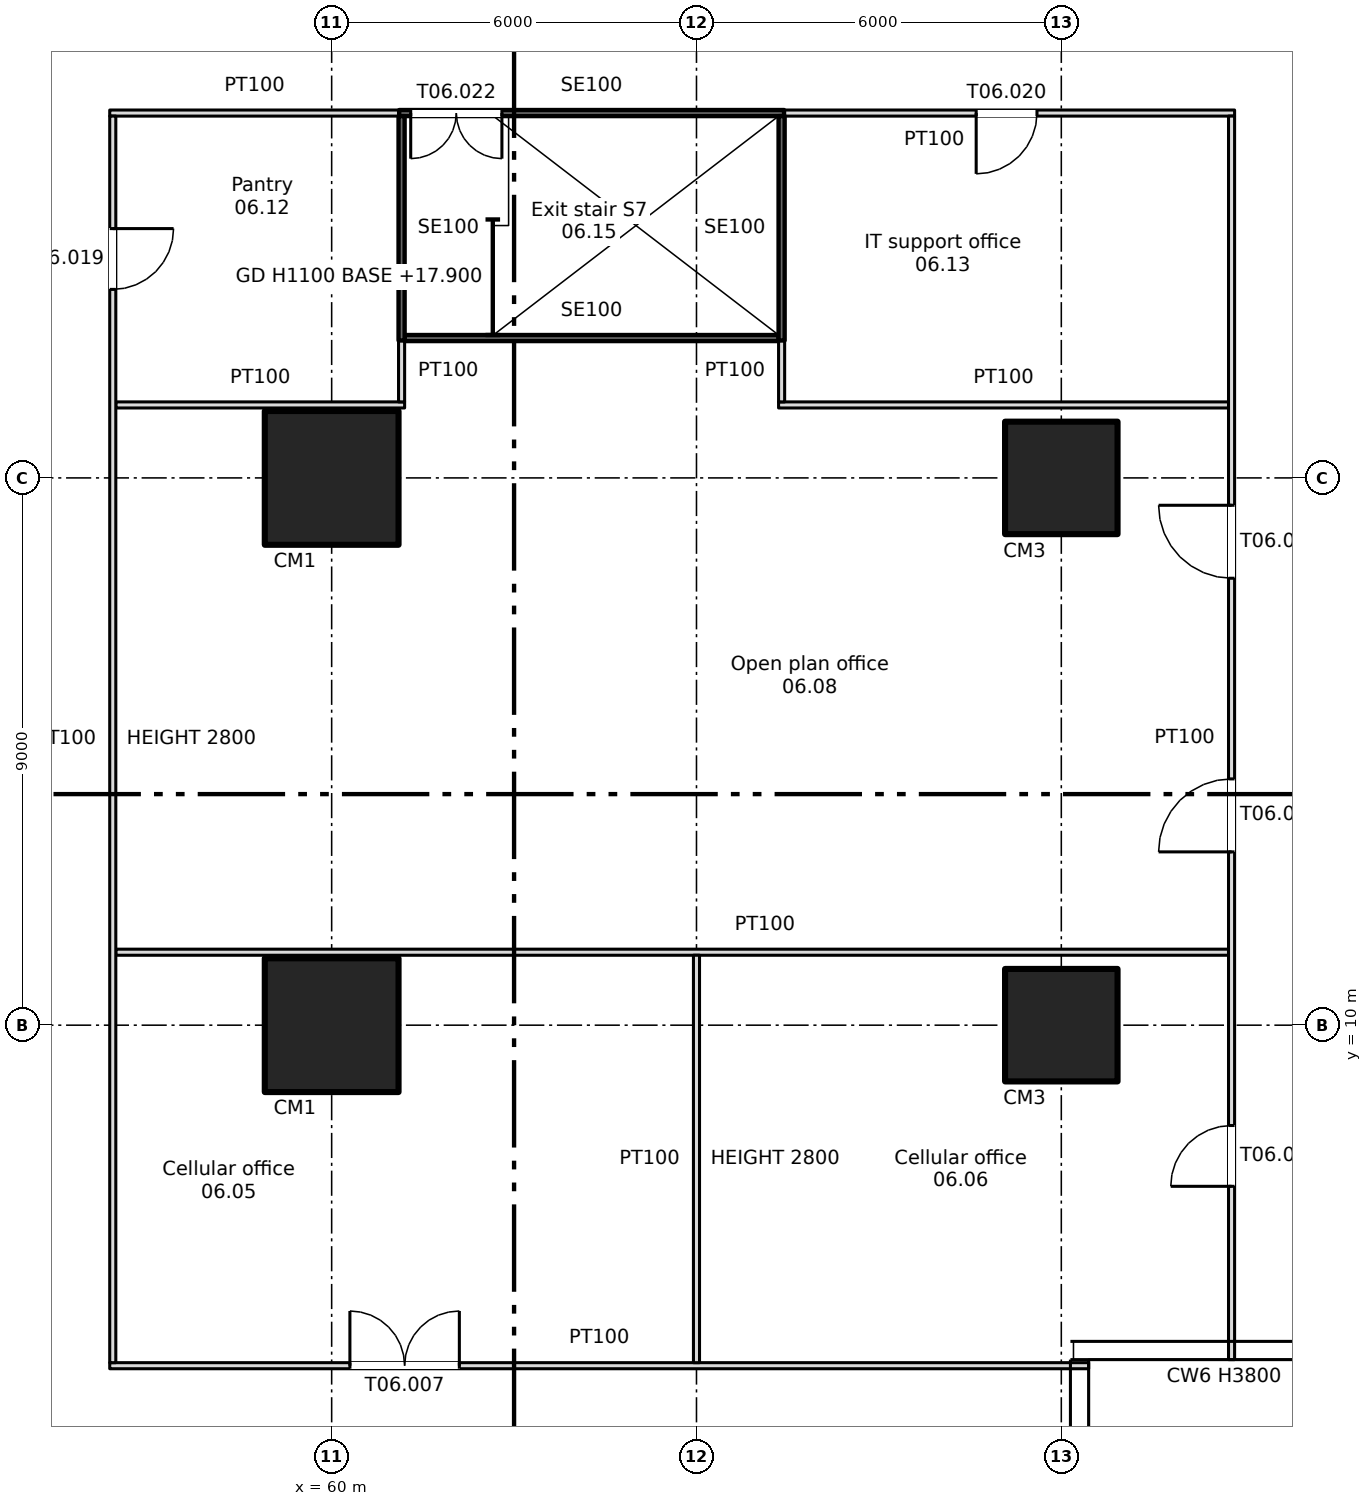
"""IFC4 building model, lengths in metres.
Left out: names, types, materials, properties, quantities, classifications, styles, units other than length and angle.
Written with IfcOpenShell. Run it as: python <this file> out.ifc"""

import sys

from ifc_helpers import new_model, si_unit, direction, frame, frame_2d, origin, origin_2d, place, context, subcontext, project, spatial, rectangle, extrude, element, fill, save


model = new_model("IFC4")
c1 = context("Model", 3, precision=1e-05, world=origin(), true_north=direction((0.0, 1.0)))
c2 = subcontext(c1, "Body", "Model", "MODEL_VIEW")
j1 = project(units=[si_unit("LENGTHUNIT", "METRE"), si_unit("PLANEANGLEUNIT", "RADIAN")], contexts=[c1])
p1 = place(None, origin())
s1 = spatial("IfcSite", under=j1, at=p1, CompositionType="ELEMENT")
p2 = place(p1, origin())
s2 = spatial("IfcBuilding", under=s1, at=p2, CompositionType="ELEMENT")
p3 = place(p2, frame((0.0, 0.0, 17.9)))
s3 = spatial("IfcBuildingStorey", under=s2, at=p3, CompositionType="ELEMENT", Elevation=17.9)
for number, where, z_axis, x_axis in (
    (1, (60.0, 10.0, 0.0), (0.0, 0.0, 1.0), (1.0, 0.0, 0.0)),
    (2, (60.0, 19.0, 0.0), (0.0, 0.0, 1.0), (1.0, 0.0, 0.0)),
):
    element("IfcColumn", number, at=place(p3, frame(where, z_axis=z_axis, x_axis=x_axis)), inside=s3, PredefinedType="COLUMN", context=c2, shape_type="SweptSolid", body=[
        extrude(rectangle(XDim=2.2, YDim=2.2, at=origin_2d()), origin(), (0.0, 0.0, 1.0), 3.8),
    ])
for number, where, z_axis, x_axis in (
    (3, (72.0, 10.0, 0.0), (0.0, 0.0, 1.0), (1.0, 0.0, 0.0)),
    (4, (72.0, 19.0, 0.0), (0.0, 0.0, 1.0), (1.0, 0.0, 0.0)),
):
    element("IfcColumn", number, at=place(p3, frame(where, z_axis=z_axis, x_axis=x_axis)), inside=s3, PredefinedType="COLUMN", context=c2, shape_type="SweptSolid", body=[
        extrude(rectangle(XDim=1.85, YDim=1.85, at=origin_2d()), origin(), (0.0, 0.0, 1.0), 3.8),
    ])
p4 = place(p3, frame((56.35, 4.4, 0.0), z_axis=(0.0, 0.0, 1.0), x_axis=(1.0, 0.0, 0.0)))
e5 = element("IfcWall", 5, at=p4, inside=s3, PredefinedType="PARTITIONING", context=c2, shape_type="SweptSolid", body=[
    extrude(rectangle(XDim=16.1, YDim=0.1, at=frame_2d((8.05, 0.0))), origin(), (0.0, 0.0, 1.0), 3.8),
])
p5 = place(p4, frame((3.95, 0.0, 0.0)))
e6 = element("IfcOpeningElement", 6, at=p5, cuts=e5, PredefinedType="OPENING", context=c2, shape_type="SweptSolid", body=[
    extrude(rectangle(XDim=1.8, YDim=2.1, at=frame_2d((0.9, 1.05))), frame((0.0, 0.06, 0.0), z_axis=(0.0, -1.0, 0.0), x_axis=(1.0, 0.0, 0.0)), (0.0, 0.0, 1.0), 0.12),
])
p6 = place(p3, frame((56.45, 11.2, 0.0), z_axis=(0.0, 0.0, 1.0), x_axis=(1.0, 0.0, 0.0)))
e7 = element("IfcWall", 7, at=p6, inside=s3, PredefinedType="PARTITIONING", context=c2, shape_type="SweptSolid", body=[
    extrude(rectangle(XDim=18.3, YDim=0.1, at=frame_2d((9.15, 0.0))), origin(), (0.0, 0.0, 1.0), 3.8),
])
p7 = place(p3, frame((56.45, 20.2, 0.0), z_axis=(0.0, 0.0, 1.0), x_axis=(1.0, 0.0, 0.0)))
e8 = element("IfcWall", 8, at=p7, inside=s3, PredefinedType="PARTITIONING", context=c2, shape_type="SweptSolid", body=[
    extrude(rectangle(XDim=4.75, YDim=0.1, at=frame_2d((2.375, 0.0))), origin(), (0.0, 0.0, 1.0), 3.8),
])
p8 = place(p3, frame((67.35, 20.2, 0.0), z_axis=(0.0, 0.0, 1.0), x_axis=(1.0, 0.0, 0.0)))
e9 = element("IfcWall", 9, at=p8, inside=s3, PredefinedType="PARTITIONING", context=c2, shape_type="SweptSolid", body=[
    extrude(rectangle(XDim=7.4, YDim=0.1, at=frame_2d((3.7, 0.0))), origin(), (0.0, 0.0, 1.0), 3.8),
])
p9 = place(p3, frame((61.2, 21.3, 0.0), z_axis=(0.0, 0.0, 1.0), x_axis=(1.0, 0.0, 0.0)))
e10 = element("IfcWall", 10, at=p9, inside=s3, PredefinedType="SOLIDWALL", context=c2, shape_type="SweptSolid", body=[
    extrude(rectangle(XDim=6.15, YDim=0.1, at=frame_2d((3.075, 0.0))), origin(), (0.0, 0.0, 1.0), 3.8),
])
p10 = place(p3, frame((56.35, 25.0, 0.0), z_axis=(0.0, 0.0, 1.0), x_axis=(1.0, 0.0, 0.0)))
e11 = element("IfcWall", 11, at=p10, inside=s3, PredefinedType="PARTITIONING", context=c2, shape_type="SweptSolid", body=[
    extrude(rectangle(XDim=4.76, YDim=0.1, at=frame_2d((2.38, 0.0))), origin(), (0.0, 0.0, 1.0), 3.8),
])
p11 = place(p3, frame((61.11, 25.0, 0.0), z_axis=(0.0, 0.0, 1.0), x_axis=(1.0, 0.0, 0.0)))
e12 = element("IfcWall", 12, at=p11, inside=s3, PredefinedType="SOLIDWALL", context=c2, shape_type="SweptSolid", body=[
    extrude(rectangle(XDim=6.33, YDim=0.1, at=frame_2d((3.165, 0.0))), origin(), (0.0, 0.0, 1.0), 3.8),
])
p12 = place(p11, frame((0.19, 0.0, 0.0)))
e13 = element("IfcOpeningElement", 13, at=p12, cuts=e12, PredefinedType="OPENING", context=c2, shape_type="SweptSolid", body=[
    extrude(rectangle(XDim=1.5, YDim=2.1, at=frame_2d((0.75, 1.05))), frame((0.0, 0.06, 0.0), z_axis=(0.0, -1.0, 0.0), x_axis=(1.0, 0.0, 0.0)), (0.0, 0.0, 1.0), 0.12),
])
p13 = place(p3, frame((67.44, 25.0, 0.0), z_axis=(0.0, 0.0, 1.0), x_axis=(1.0, 0.0, 0.0)))
e14 = element("IfcWall", 14, at=p13, inside=s3, PredefinedType="PARTITIONING", context=c2, shape_type="SweptSolid", body=[
    extrude(rectangle(XDim=7.41, YDim=0.1, at=frame_2d((3.705, 0.0))), origin(), (0.0, 0.0, 1.0), 3.8),
])
p14 = place(p13, frame((3.16, 0.0, 0.0)))
e15 = element("IfcOpeningElement", 15, at=p14, cuts=e14, PredefinedType="OPENING", context=c2, shape_type="SweptSolid", body=[
    extrude(rectangle(XDim=1.0, YDim=2.1, at=frame_2d((0.5, 1.05))), frame((0.0, 0.06, 0.0), z_axis=(0.0, -1.0, 0.0), x_axis=(1.0, 0.0, 0.0)), (0.0, 0.0, 1.0), 0.12),
])
p15 = place(p3, frame((56.4, 4.45, 0.0), z_axis=(0.0, 0.0, 1.0), x_axis=(0.0, 1.0, 0.0)))
e16 = element("IfcWall", 16, at=p15, inside=s3, PredefinedType="PARTITIONING", context=c2, shape_type="SweptSolid", body=[
    extrude(rectangle(XDim=20.5, YDim=0.1, at=frame_2d((10.25, 0.0))), origin(), (0.0, 0.0, 1.0), 2.8),
])
p16 = place(p15, frame((17.65, 0.0, 0.0)))
e17 = element("IfcOpeningElement", 17, at=p16, cuts=e16, PredefinedType="OPENING", context=c2, shape_type="SweptSolid", body=[
    extrude(rectangle(XDim=1.0, YDim=2.1, at=frame_2d((0.5, 1.05))), frame((0.0, 0.06, 0.0), z_axis=(0.0, -1.0, 0.0), x_axis=(1.0, 0.0, 0.0)), (0.0, 0.0, 1.0), 0.12),
])
p17 = place(p3, frame((61.15, 20.25, 0.0), z_axis=(0.0, 0.0, 1.0), x_axis=(0.0, 1.0, 0.0)))
e18 = element("IfcWall", 18, at=p17, inside=s3, PredefinedType="PARTITIONING", context=c2, shape_type="SweptSolid", body=[
    extrude(rectangle(XDim=1.01, YDim=0.1, at=frame_2d((0.505, 0.0))), origin(), (0.0, 0.0, 1.0), 3.8),
])
p18 = place(p3, frame((61.15, 21.26, 0.0), z_axis=(0.0, 0.0, 1.0), x_axis=(0.0, 1.0, 0.0)))
e19 = element("IfcWall", 19, at=p18, inside=s3, PredefinedType="SOLIDWALL", context=c2, shape_type="SweptSolid", body=[
    extrude(rectangle(XDim=3.69, YDim=0.1, at=frame_2d((1.845, 0.0))), origin(), (0.0, 0.0, 1.0), 3.8),
])
p19 = place(p3, frame((66.0, 4.45, 0.0), z_axis=(0.0, 0.0, 1.0), x_axis=(0.0, 1.0, 0.0)))
e20 = element("IfcWall", 20, at=p19, inside=s3, PredefinedType="PARTITIONING", context=c2, shape_type="SweptSolid", body=[
    extrude(rectangle(XDim=6.7, YDim=0.1, at=frame_2d((3.35, 0.0))), origin(), (0.0, 0.0, 1.0), 2.8),
])
p20 = place(p3, frame((67.4, 20.25, 0.0), z_axis=(0.0, 0.0, 1.0), x_axis=(0.0, 1.0, 0.0)))
e21 = element("IfcWall", 21, at=p20, inside=s3, PredefinedType="PARTITIONING", context=c2, shape_type="SweptSolid", body=[
    extrude(rectangle(XDim=1.01, YDim=0.1, at=frame_2d((0.505, 0.0))), origin(), (0.0, 0.0, 1.0), 3.8),
])
p21 = place(p3, frame((67.4, 21.26, 0.0), z_axis=(0.0, 0.0, 1.0), x_axis=(0.0, 1.0, 0.0)))
e22 = element("IfcWall", 22, at=p21, inside=s3, PredefinedType="SOLIDWALL", context=c2, shape_type="SweptSolid", body=[
    extrude(rectangle(XDim=3.69, YDim=0.1, at=frame_2d((1.845, 0.0))), origin(), (0.0, 0.0, 1.0), 3.8),
])
p22 = place(p3, frame((74.8, 4.5, 0.0), z_axis=(0.0, 0.0, 1.0), x_axis=(0.0, 1.0, 0.0)))
e23 = element("IfcWall", 23, at=p22, inside=s3, PredefinedType="PARTITIONING", context=c2, shape_type="SweptSolid", body=[
    extrude(rectangle(XDim=20.45, YDim=0.1, at=frame_2d((10.225, 0.0))), origin(), (0.0, 0.0, 1.0), 3.8),
])
p23 = place(p22, frame((2.85, 0.0, 0.0)))
e24 = element("IfcOpeningElement", 24, at=p23, cuts=e23, PredefinedType="OPENING", context=c2, shape_type="SweptSolid", body=[
    extrude(rectangle(XDim=1.0, YDim=2.1, at=frame_2d((0.5, 1.05))), frame((0.0, 0.06, 0.0), z_axis=(0.0, -1.0, 0.0), x_axis=(1.0, 0.0, 0.0)), (0.0, 0.0, 1.0), 0.12),
])
p24 = place(p22, frame((8.35, 0.0, 0.0)))
e25 = element("IfcOpeningElement", 25, at=p24, cuts=e23, PredefinedType="OPENING", context=c2, shape_type="SweptSolid", body=[
    extrude(rectangle(XDim=1.2, YDim=2.1, at=frame_2d((0.6, 1.05))), frame((0.0, 0.06, 0.0), z_axis=(0.0, -1.0, 0.0), x_axis=(1.0, 0.0, 0.0)), (0.0, 0.0, 1.0), 0.12),
])
p25 = place(p22, frame((12.85, 0.0, 0.0)))
e26 = element("IfcOpeningElement", 26, at=p25, cuts=e23, PredefinedType="OPENING", context=c2, shape_type="SweptSolid", body=[
    extrude(rectangle(XDim=1.2, YDim=2.1, at=frame_2d((0.6, 1.05))), frame((0.0, 0.06, 0.0), z_axis=(0.0, -1.0, 0.0), x_axis=(1.0, 0.0, 0.0)), (0.0, 0.0, 1.0), 0.12),
])
p26 = place(p5, origin())
e27 = element("IfcDoor", 27, at=p26, inside=s3, OperationType="DOUBLE_DOOR_SINGLE_SWING", PredefinedType="DOOR", context=c2, shape_type="SweptSolid", body=[
    extrude(rectangle(XDim=1.8, YDim=2.1, at=frame_2d((0.9, 1.05))), frame((0.0, 0.025, 0.0), z_axis=(0.0, -1.0, 0.0), x_axis=(1.0, 0.0, 0.0)), (0.0, 0.0, 1.0), 0.05),
])
fill(e6, e27)
p27 = place(p23, origin())
e28 = element("IfcDoor", 28, at=p27, inside=s3, OperationType="SINGLE_SWING_LEFT", PredefinedType="DOOR", context=c2, shape_type="SweptSolid", body=[
    extrude(rectangle(XDim=1.0, YDim=2.1, at=frame_2d((0.5, 1.05))), frame((0.0, 0.025, 0.0), z_axis=(0.0, -1.0, 0.0), x_axis=(1.0, 0.0, 0.0)), (0.0, 0.0, 1.0), 0.05),
])
fill(e24, e28)
p28 = place(p24, origin())
e29 = element("IfcDoor", 29, at=p28, inside=s3, OperationType="SINGLE_SWING_LEFT", PredefinedType="DOOR", context=c2, shape_type="SweptSolid", body=[
    extrude(rectangle(XDim=1.2, YDim=2.1, at=frame_2d((0.6, 1.05))), frame((0.0, 0.025, 0.0), z_axis=(0.0, -1.0, 0.0), x_axis=(1.0, 0.0, 0.0)), (0.0, 0.0, 1.0), 0.05),
])
fill(e25, e29)
p29 = place(p25, origin())
e30 = element("IfcDoor", 30, at=p29, inside=s3, OperationType="SINGLE_SWING_RIGHT", PredefinedType="DOOR", context=c2, shape_type="SweptSolid", body=[
    extrude(rectangle(XDim=1.2, YDim=2.1, at=frame_2d((0.6, 1.05))), frame((0.0, 0.025, 0.0), z_axis=(0.0, -1.0, 0.0), x_axis=(1.0, 0.0, 0.0)), (0.0, 0.0, 1.0), 0.05),
])
fill(e26, e30)
p30 = place(p16, origin())
e31 = element("IfcDoor", 31, at=p30, inside=s3, OperationType="SINGLE_SWING_RIGHT", PredefinedType="DOOR", context=c2, shape_type="SweptSolid", body=[
    extrude(rectangle(XDim=1.0, YDim=2.1, at=frame_2d((0.5, 1.05))), frame((0.0, 0.025, 0.0), z_axis=(0.0, -1.0, 0.0), x_axis=(1.0, 0.0, 0.0)), (0.0, 0.0, 1.0), 0.05),
])
fill(e17, e31)
p31 = place(p14, origin())
e32 = element("IfcDoor", 32, at=p31, inside=s3, OperationType="SINGLE_SWING_LEFT", PredefinedType="DOOR", context=c2, shape_type="SweptSolid", body=[
    extrude(rectangle(XDim=1.0, YDim=2.1, at=frame_2d((0.5, 1.05))), frame((0.0, 0.025, 0.0), z_axis=(0.0, -1.0, 0.0), x_axis=(1.0, 0.0, 0.0)), (0.0, 0.0, 1.0), 0.05),
])
fill(e15, e32)
p32 = place(p12, origin())
e33 = element("IfcDoor", 33, at=p32, inside=s3, OperationType="DOUBLE_DOOR_SINGLE_SWING", PredefinedType="DOOR", context=c2, shape_type="SweptSolid", body=[
    extrude(rectangle(XDim=1.5, YDim=2.1, at=frame_2d((0.75, 1.05))), frame((0.0, 0.025, 0.0), z_axis=(0.0, -1.0, 0.0), x_axis=(1.0, 0.0, 0.0)), (0.0, 0.0, 1.0), 0.05),
])
fill(e13, e33)
save(model, sys.argv[1])
